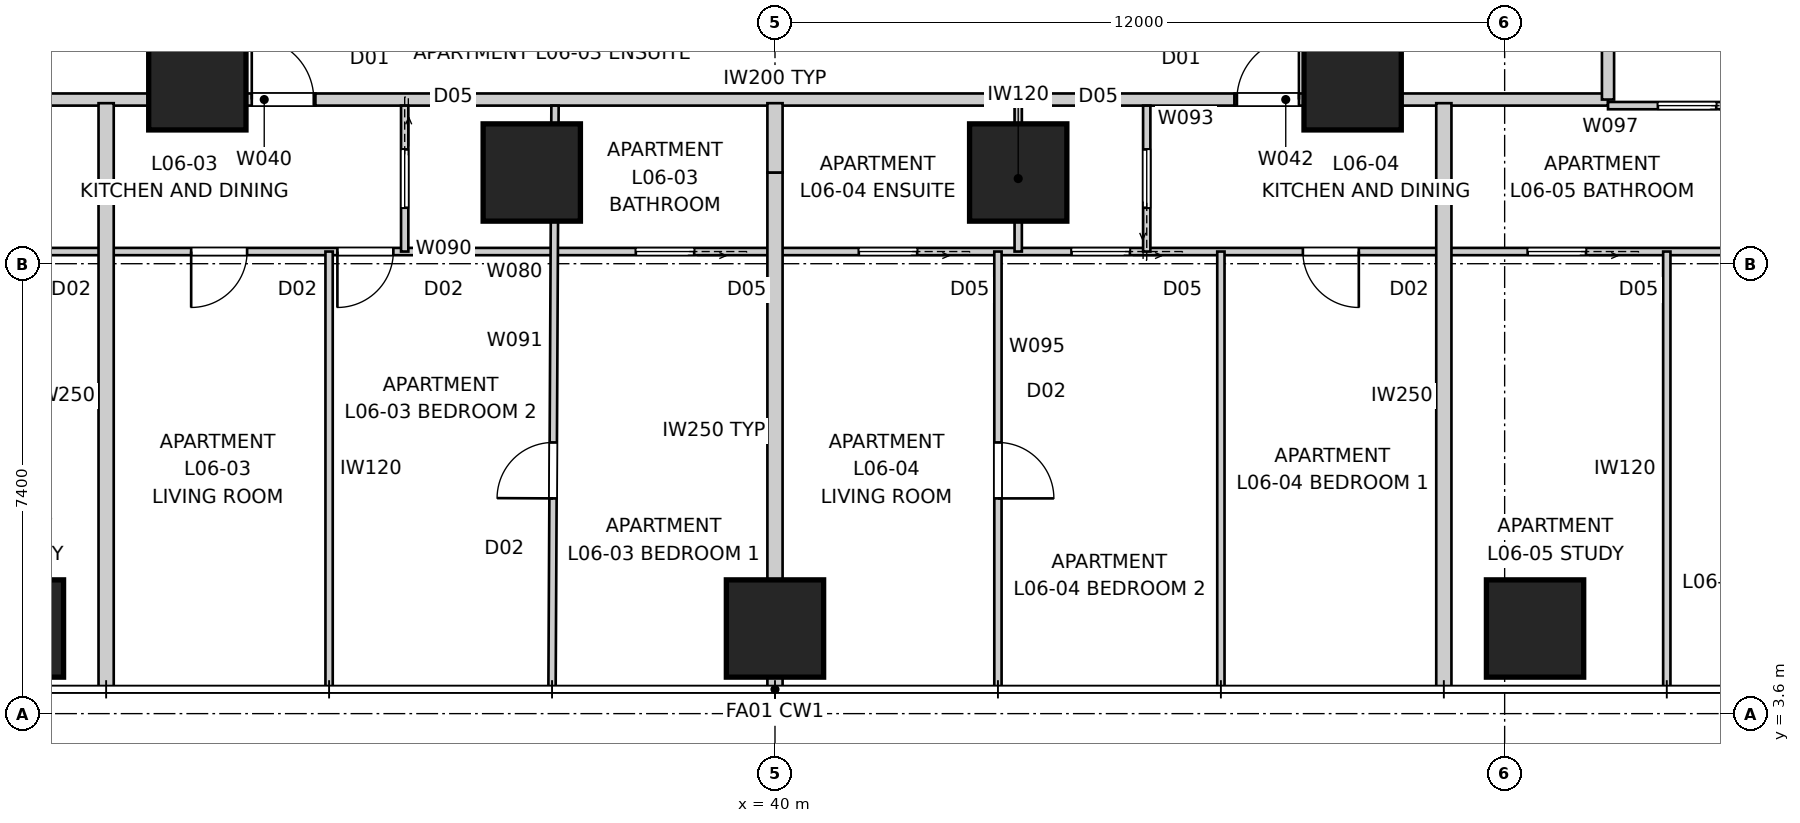
"""IFC4 building model, lengths in metres.
Left out: names, types, materials, properties, quantities, classifications, styles, units other than length and angle.
Written with IfcOpenShell. Run it as: python <this file> out.ifc"""

import sys

from ifc_helpers import new_model, si_unit, direction, frame, frame_2d, origin, origin_2d, place, context, subcontext, project, spatial, rectangle, extrude, element, fill, save


model = new_model("IFC4")
c1 = context("Model", 3, precision=1e-05, world=origin(), true_north=direction((0.0, 1.0)))
c2 = subcontext(c1, "Body", "Model", "MODEL_VIEW")
j1 = project(units=[si_unit("LENGTHUNIT", "METRE"), si_unit("PLANEANGLEUNIT", "RADIAN")], contexts=[c1])
p1 = place(None, origin())
s1 = spatial("IfcSite", under=j1, at=p1, CompositionType="ELEMENT")
p2 = place(p1, origin())
s2 = spatial("IfcBuilding", under=s1, at=p2, CompositionType="ELEMENT")
p3 = place(p2, frame((0.0, 0.0, 25.2)))
s3 = spatial("IfcBuildingStorey", under=s2, at=p3, CompositionType="ELEMENT", Elevation=25.2)
for number, where, z_axis, x_axis in (
    (1, (27.5, 5.0, 0.0), (0.0, 0.0, 1.0), (1.0, 0.0, 0.0)),
    (2, (40.0, 5.0, 0.0), (0.0, 0.0, 1.0), (1.0, 0.0, 0.0)),
    (3, (52.5, 5.0, 0.0), (0.0, 0.0, 1.0), (1.0, 0.0, 0.0)),
    (4, (30.5, 14.0, 0.0), (0.0, 0.0, 1.0), (1.0, 0.0, 0.0)),
    (5, (36.0, 12.5, 0.0), (0.0, 0.0, 1.0), (1.0, 0.0, 0.0)),
    (6, (44.0, 12.5, 0.0), (0.0, 0.0, 1.0), (1.0, 0.0, 0.0)),
    (7, (49.5, 14.0, 0.0), (0.0, 0.0, 1.0), (1.0, 0.0, 0.0)),
):
    element("IfcColumn", number, at=place(p3, frame(where, z_axis=z_axis, x_axis=x_axis)), inside=s3, PredefinedType="COLUMN", context=c2, shape_type="SweptSolid", body=[
        extrude(rectangle(XDim=1.6, YDim=1.6, at=origin_2d()), origin(), (0.0, 0.0, 1.0), 3.4),
    ])
p4 = place(p3, frame((26.3, 13.7, 0.0), z_axis=(0.0, 0.0, 1.0), x_axis=(1.0, 0.0, 0.0)))
e8 = element("IfcWall", 8, at=p4, inside=s3, PredefinedType="PARTITIONING", context=c2, shape_type="SweptSolid", body=[
    extrude(rectangle(XDim=4.458, YDim=0.2, at=frame_2d((2.229, 0.0))), origin(), (0.0, 0.0, 1.0), 3.25),
])
p5 = place(p3, frame((30.758, 13.7, 0.0), z_axis=(0.0, 0.0, 1.0), x_axis=(1.0, 0.0, 0.0)))
e9 = element("IfcWall", 9, at=p5, inside=s3, PredefinedType="PARTITIONING", context=c2, shape_type="SweptSolid", body=[
    extrude(rectangle(XDim=1.683, YDim=0.2, at=frame_2d((0.842, 0.0))), origin(), (0.0, 0.0, 1.0), 2.55),
])
p6 = place(p5, frame((0.637, 0.0, 0.0)))
e10 = element("IfcOpeningElement", 10, at=p6, cuts=e9, PredefinedType="OPENING", context=c2, shape_type="SweptSolid", body=[
    extrude(rectangle(XDim=1.02, YDim=2.34, at=frame_2d((0.51, 1.17))), frame((0.0, 0.11, 0.0), z_axis=(0.0, -1.0, 0.0), x_axis=(1.0, 0.0, 0.0)), (0.0, 0.0, 1.0), 0.22),
])
p7 = place(p3, frame((32.442, 13.7, 0.0), z_axis=(0.0, 0.0, 1.0), x_axis=(1.0, 0.0, 0.0)))
e11 = element("IfcWall", 11, at=p7, inside=s3, PredefinedType="PARTITIONING", context=c2, shape_type="SweptSolid", body=[
    extrude(rectangle(XDim=15.117, YDim=0.2, at=frame_2d((7.558, 0.0))), origin(), (0.0, 0.0, 1.0), 3.25),
])
p8 = place(p3, frame((47.558, 13.7, 0.0), z_axis=(0.0, 0.0, 1.0), x_axis=(1.0, 0.0, 0.0)))
e12 = element("IfcWall", 12, at=p8, inside=s3, PredefinedType="PARTITIONING", context=c2, shape_type="SweptSolid", body=[
    extrude(rectangle(XDim=1.683, YDim=0.2, at=frame_2d((0.842, 0.0))), origin(), (0.0, 0.0, 1.0), 2.55),
])
p9 = place(p8, frame((0.039, 0.0, 0.0)))
e13 = element("IfcOpeningElement", 13, at=p9, cuts=e12, PredefinedType="OPENING", context=c2, shape_type="SweptSolid", body=[
    extrude(rectangle(XDim=1.02, YDim=2.34, at=frame_2d((0.51, 1.17))), frame((0.0, 0.11, 0.0), z_axis=(0.0, -1.0, 0.0), x_axis=(1.0, 0.0, 0.0)), (0.0, 0.0, 1.0), 0.22),
])
p10 = place(p3, frame((49.242, 13.7, 0.0), z_axis=(0.0, 0.0, 1.0), x_axis=(1.0, 0.0, 0.0)))
e14 = element("IfcWall", 14, at=p10, inside=s3, PredefinedType="PARTITIONING", context=c2, shape_type="SweptSolid", body=[
    extrude(rectangle(XDim=4.458, YDim=0.2, at=frame_2d((2.229, 0.0))), origin(), (0.0, 0.0, 1.0), 3.25),
])
p11 = place(p3, frame((53.7, 13.7, 0.0), z_axis=(0.0, 0.0, 1.0), x_axis=(0.0, 1.0, 0.0)))
e15 = element("IfcWall", 15, at=p11, inside=s3, PredefinedType="PARTITIONING", context=c2, shape_type="SweptSolid", body=[
    extrude(rectangle(XDim=32.6, YDim=0.2, at=frame_2d((16.3, 0.0))), origin(), (0.0, 0.0, 1.0), 3.25),
])
p12 = place(p11, frame((2.315, 0.0, 0.0)))
e16 = element("IfcOpeningElement", 16, at=p12, cuts=e15, PredefinedType="OPENING", context=c2, shape_type="SweptSolid", body=[
    extrude(rectangle(XDim=1.02, YDim=2.34, at=frame_2d((0.51, 1.17))), frame((0.0, 0.11, 0.0), z_axis=(0.0, -1.0, 0.0), x_axis=(1.0, 0.0, 0.0)), (0.0, 0.0, 1.0), 0.22),
])
p13 = place(p11, frame((29.265, 0.0, 0.0)))
e17 = element("IfcOpeningElement", 17, at=p13, cuts=e15, PredefinedType="OPENING", context=c2, shape_type="SweptSolid", body=[
    extrude(rectangle(XDim=1.02, YDim=2.34, at=frame_2d((0.51, 1.17))), frame((0.0, 0.11, 0.0), z_axis=(0.0, -1.0, 0.0), x_axis=(1.0, 0.0, 0.0)), (0.0, 0.0, 1.0), 0.22),
])
p14 = place(p11, frame((20.646, 0.0, 0.0)))
e18 = element("IfcOpeningElement", 18, at=p14, cuts=e15, PredefinedType="OPENING", context=c2, shape_type="SweptSolid", body=[
    extrude(rectangle(XDim=1.02, YDim=2.34, at=frame_2d((0.51, 1.17))), frame((0.0, 0.11, 0.0), z_axis=(0.0, -1.0, 0.0), x_axis=(1.0, 0.0, 0.0)), (0.0, 0.0, 1.0), 0.22),
])
p15 = place(p11, frame((13.626, 0.0, 0.0)))
e19 = element("IfcOpeningElement", 19, at=p15, cuts=e15, PredefinedType="OPENING", context=c2, shape_type="SweptSolid", body=[
    extrude(rectangle(XDim=1.02, YDim=2.34, at=frame_2d((0.51, 1.17))), frame((0.0, 0.11, 0.0), z_axis=(0.0, -1.0, 0.0), x_axis=(1.0, 0.0, 0.0)), (0.0, 0.0, 1.0), 0.22),
])
p16 = place(p3, frame((29.0, 4.0, 0.0), z_axis=(0.0, 0.0, 1.0), x_axis=(0.0, 1.0, 0.0)))
e20 = element("IfcWall", 20, at=p16, inside=s3, PredefinedType="PARTITIONING", context=c2, shape_type="SweptSolid", body=[
    extrude(rectangle(XDim=9.64, YDim=0.25, at=frame_2d((4.82, 0.0))), origin(), (0.0, 0.0, 1.0), 3.25),
])
p17 = place(p3, frame((40.0, 4.0, 0.0), z_axis=(0.0, 0.0, 1.0), x_axis=(0.0, 1.0, 0.0)))
e21 = element("IfcWall", 21, at=p17, inside=s3, PredefinedType="PARTITIONING", context=c2, shape_type="SweptSolid", body=[
    extrude(rectangle(XDim=8.5, YDim=0.25, at=frame_2d((4.25, 0.0))), origin(), (0.0, 0.0, 1.0), 3.25),
])
p18 = place(p3, frame((40.0, 12.5, 0.0), z_axis=(0.0, 0.0, 1.0), x_axis=(0.0, 1.0, 0.0)))
e22 = element("IfcWall", 22, at=p18, inside=s3, PredefinedType="PARTITIONING", context=c2, shape_type="SweptSolid", body=[
    extrude(rectangle(XDim=1.14, YDim=0.25, at=frame_2d((0.57, 0.0))), origin(), (0.0, 0.0, 1.0), 2.796),
])
p19 = place(p3, frame((51.0, 4.0, 0.0), z_axis=(0.0, 0.0, 1.0), x_axis=(0.0, 1.0, 0.0)))
e23 = element("IfcWall", 23, at=p19, inside=s3, PredefinedType="PARTITIONING", context=c2, shape_type="SweptSolid", body=[
    extrude(rectangle(XDim=9.64, YDim=0.25, at=frame_2d((4.82, 0.0))), origin(), (0.0, 0.0, 1.0), 3.25),
])
p20 = place(p3, frame((56.2, 11.2, 0.0), z_axis=(0.0, 0.0, 1.0), x_axis=(-1.0, 0.0, 0.0)))
e24 = element("IfcWall", 24, at=p20, inside=s3, PredefinedType="PARTITIONING", context=c2, shape_type="SweptSolid", body=[
    extrude(rectangle(XDim=32.4, YDim=0.12, at=frame_2d((16.2, 0.0))), origin(), (0.0, 0.0, 1.0), 3.25),
])
p21 = place(p20, frame((24.882, 0.0, 0.0)))
e25 = element("IfcOpeningElement", 25, at=p21, cuts=e24, PredefinedType="OPENING", context=c2, shape_type="SweptSolid", body=[
    extrude(rectangle(XDim=0.92, YDim=2.34, at=frame_2d((0.46, 1.17))), frame((0.0, 0.07, 0.0), z_axis=(0.0, -1.0, 0.0), x_axis=(1.0, 0.0, 0.0)), (0.0, 0.0, 1.0), 0.14),
])
p22 = place(p20, frame((22.477, 0.0, 0.0)))
e26 = element("IfcOpeningElement", 26, at=p22, cuts=e24, PredefinedType="OPENING", context=c2, shape_type="SweptSolid", body=[
    extrude(rectangle(XDim=0.92, YDim=2.34, at=frame_2d((0.46, 1.17))), frame((0.0, 0.07, 0.0), z_axis=(0.0, -1.0, 0.0), x_axis=(1.0, 0.0, 0.0)), (0.0, 0.0, 1.0), 0.14),
])
p23 = place(p20, frame((6.598, 0.0, 0.0)))
e27 = element("IfcOpeningElement", 27, at=p23, cuts=e24, PredefinedType="OPENING", context=c2, shape_type="SweptSolid", body=[
    extrude(rectangle(XDim=0.92, YDim=2.34, at=frame_2d((0.46, 1.17))), frame((0.0, 0.07, 0.0), z_axis=(0.0, -1.0, 0.0), x_axis=(1.0, 0.0, 0.0)), (0.0, 0.0, 1.0), 0.14),
])
p24 = place(p20, frame((28.598, 0.0, 0.0)))
e28 = element("IfcOpeningElement", 28, at=p24, cuts=e24, PredefinedType="OPENING", context=c2, shape_type="SweptSolid", body=[
    extrude(rectangle(XDim=0.92, YDim=2.34, at=frame_2d((0.46, 1.17))), frame((0.0, 0.07, 0.0), z_axis=(0.0, -1.0, 0.0), x_axis=(1.0, 0.0, 0.0)), (0.0, 0.0, 1.0), 0.14),
])
p25 = place(p20, frame((2.862, 0.0, 0.0)))
e29 = element("IfcOpeningElement", 29, at=p25, cuts=e24, PredefinedType="OPENING", context=c2, shape_type="SweptSolid", body=[
    extrude(rectangle(XDim=0.96, YDim=2.1, at=frame_2d((0.48, 1.05))), frame((0.0, 0.07, 0.0), z_axis=(0.0, -1.0, 0.0), x_axis=(1.0, 0.0, 0.0)), (0.0, 0.0, 1.0), 0.14),
])
p26 = place(p20, frame((10.363, 0.0, 0.0)))
e30 = element("IfcOpeningElement", 30, at=p26, cuts=e24, PredefinedType="OPENING", context=c2, shape_type="SweptSolid", body=[
    extrude(rectangle(XDim=0.96, YDim=2.1, at=frame_2d((0.48, 1.05))), frame((0.0, 0.07, 0.0), z_axis=(0.0, -1.0, 0.0), x_axis=(1.0, 0.0, 0.0)), (0.0, 0.0, 1.0), 0.14),
])
p27 = place(p20, frame((13.862, 0.0, 0.0)))
e31 = element("IfcOpeningElement", 31, at=p27, cuts=e24, PredefinedType="OPENING", context=c2, shape_type="SweptSolid", body=[
    extrude(rectangle(XDim=0.96, YDim=2.1, at=frame_2d((0.48, 1.05))), frame((0.0, 0.07, 0.0), z_axis=(0.0, -1.0, 0.0), x_axis=(1.0, 0.0, 0.0)), (0.0, 0.0, 1.0), 0.14),
])
p28 = place(p20, frame((17.529, 0.0, 0.0)))
e32 = element("IfcOpeningElement", 32, at=p28, cuts=e24, PredefinedType="OPENING", context=c2, shape_type="SweptSolid", body=[
    extrude(rectangle(XDim=0.96, YDim=2.1, at=frame_2d((0.48, 1.05))), frame((0.0, 0.07, 0.0), z_axis=(0.0, -1.0, 0.0), x_axis=(1.0, 0.0, 0.0)), (0.0, 0.0, 1.0), 0.14),
])
p29 = place(p3, frame((33.91, 13.6, 0.0), z_axis=(0.0, 0.0, 1.0), x_axis=(0.0, -1.0, 0.0)))
e33 = element("IfcWall", 33, at=p29, inside=s3, PredefinedType="PARTITIONING", context=c2, shape_type="SweptSolid", body=[
    extrude(rectangle(XDim=2.4, YDim=0.12, at=frame_2d((1.2, 0.0))), origin(), (0.0, 0.0, 1.0), 3.25),
])
p30 = place(p29, frame((0.72, 0.0, 0.0)))
e34 = element("IfcOpeningElement", 34, at=p30, cuts=e33, PredefinedType="OPENING", context=c2, shape_type="SweptSolid", body=[
    extrude(rectangle(XDim=0.96, YDim=2.1, at=frame_2d((0.48, 1.05))), frame((0.0, 0.07, 0.0), z_axis=(0.0, -1.0, 0.0), x_axis=(1.0, 0.0, 0.0)), (0.0, 0.0, 1.0), 0.14),
])
p31 = place(p3, frame((36.333, 4.04, 0.0), z_axis=(0.0, 0.0, 1.0), x_axis=(0.005107446534, 0.99998695691, 0.0)))
e35 = element("IfcWall", 35, at=p31, inside=s3, PredefinedType="PARTITIONING", context=c2, shape_type="SweptSolid", body=[
    extrude(rectangle(XDim=9.56, YDim=0.12, at=frame_2d((4.78, 0.0))), origin(), (0.0, 0.0, 1.0), 3.25),
])
p32 = place(p31, frame((3.1, 0.0, 0.0)))
e36 = element("IfcOpeningElement", 36, at=p32, cuts=e35, PredefinedType="OPENING", context=c2, shape_type="SweptSolid", body=[
    extrude(rectangle(XDim=0.92, YDim=2.34, at=frame_2d((0.46, 1.17))), frame((0.0, 0.07, 0.0), z_axis=(0.0, -1.0, 0.0), x_axis=(1.0, 0.0, 0.0)), (0.0, 0.0, 1.0), 0.14),
])
p33 = place(p3, frame((32.667, 11.2, 0.0), z_axis=(0.0, 0.0, 1.0), x_axis=(0.0, -1.0, 0.0)))
e37 = element("IfcWall", 37, at=p33, inside=s3, PredefinedType="PARTITIONING", context=c2, shape_type="SweptSolid", body=[
    extrude(rectangle(XDim=7.16, YDim=0.12, at=frame_2d((3.58, 0.0))), origin(), (0.0, 0.0, 1.0), 3.25),
])
p34 = place(p3, frame((46.114, 11.2, 0.0), z_axis=(0.0, 0.0, 1.0), x_axis=(0.0, 1.0, 0.0)))
e38 = element("IfcWall", 38, at=p34, inside=s3, PredefinedType="PARTITIONING", context=c2, shape_type="SweptSolid", body=[
    extrude(rectangle(XDim=2.4, YDim=0.12, at=frame_2d((1.2, 0.0))), origin(), (0.0, 0.0, 1.0), 3.25),
])
p35 = place(p34, frame((0.72, 0.0, 0.0)))
e39 = element("IfcOpeningElement", 39, at=p35, cuts=e38, PredefinedType="OPENING", context=c2, shape_type="SweptSolid", body=[
    extrude(rectangle(XDim=0.96, YDim=2.1, at=frame_2d((0.48, 1.05))), frame((0.0, 0.07, 0.0), z_axis=(0.0, -1.0, 0.0), x_axis=(1.0, 0.0, 0.0)), (0.0, 0.0, 1.0), 0.14),
])
p36 = place(p3, frame((44.0, 11.2, 0.0), z_axis=(0.0, 0.0, 1.0), x_axis=(0.0, 1.0, 0.0)))
e40 = element("IfcWall", 40, at=p36, inside=s3, PredefinedType="PARTITIONING", context=c2, shape_type="SweptSolid", body=[
    extrude(rectangle(XDim=2.4, YDim=0.12, at=frame_2d((1.2, 0.0))), origin(), (0.0, 0.0, 1.0), 3.25),
])
p37 = place(p3, frame((43.667, 11.2, 0.0), z_axis=(0.0, 0.0, 1.0), x_axis=(0.0, -1.0, 0.0)))
e41 = element("IfcWall", 41, at=p37, inside=s3, PredefinedType="PARTITIONING", context=c2, shape_type="SweptSolid", body=[
    extrude(rectangle(XDim=7.16, YDim=0.12, at=frame_2d((3.58, 0.0))), origin(), (0.0, 0.0, 1.0), 3.25),
])
p38 = place(p37, frame((3.14, 0.0, 0.0)))
e42 = element("IfcOpeningElement", 42, at=p38, cuts=e41, PredefinedType="OPENING", context=c2, shape_type="SweptSolid", body=[
    extrude(rectangle(XDim=0.92, YDim=2.34, at=frame_2d((0.46, 1.17))), frame((0.0, 0.07, 0.0), z_axis=(0.0, -1.0, 0.0), x_axis=(1.0, 0.0, 0.0)), (0.0, 0.0, 1.0), 0.14),
])
p39 = place(p3, frame((47.333, 4.04, 0.0), z_axis=(0.0, 0.0, 1.0), x_axis=(0.0, 1.0, 0.0)))
e43 = element("IfcWall", 43, at=p39, inside=s3, PredefinedType="PARTITIONING", context=c2, shape_type="SweptSolid", body=[
    extrude(rectangle(XDim=7.16, YDim=0.12, at=frame_2d((3.58, 0.0))), origin(), (0.0, 0.0, 1.0), 3.25),
])
p40 = place(p3, frame((56.2, 13.6, 0.0), z_axis=(0.0, 0.0, 1.0), x_axis=(-1.0, 0.0, 0.0)))
e44 = element("IfcWall", 44, at=p40, inside=s3, PredefinedType="PARTITIONING", context=c2, shape_type="SweptSolid", body=[
    extrude(rectangle(XDim=2.5, YDim=0.12, at=frame_2d((1.25, 0.0))), origin(), (0.0, 0.0, 1.0), 3.25),
])
p41 = place(p40, frame((0.72, 0.0, 0.0)))
e45 = element("IfcOpeningElement", 45, at=p41, cuts=e44, PredefinedType="OPENING", context=c2, shape_type="SweptSolid", body=[
    extrude(rectangle(XDim=0.96, YDim=2.1, at=frame_2d((0.48, 1.05))), frame((0.0, 0.07, 0.0), z_axis=(0.0, -1.0, 0.0), x_axis=(1.0, 0.0, 0.0)), (0.0, 0.0, 1.0), 0.14),
])
p42 = place(p3, frame((54.667, 4.04, 0.0), z_axis=(0.0, 0.0, 1.0), x_axis=(0.0, 1.0, 0.0)))
e46 = element("IfcWall", 46, at=p42, inside=s3, PredefinedType="PARTITIONING", context=c2, shape_type="SweptSolid", body=[
    extrude(rectangle(XDim=7.16, YDim=0.12, at=frame_2d((3.58, 0.0))), origin(), (0.0, 0.0, 1.0), 2.637),
])
p43 = place(p6, origin())
e47 = element("IfcDoor", 47, at=p43, inside=s3, OperationType="SINGLE_SWING_LEFT", PredefinedType="DOOR", context=c2, shape_type="SweptSolid", body=[
    extrude(rectangle(XDim=1.02, YDim=2.34, at=frame_2d((0.51, 1.17))), frame((0.0, 0.025, 0.0), z_axis=(0.0, -1.0, 0.0), x_axis=(1.0, 0.0, 0.0)), (0.0, 0.0, 1.0), 0.05),
])
fill(e10, e47)
p44 = place(p9, origin())
e48 = element("IfcDoor", 48, at=p44, inside=s3, OperationType="SINGLE_SWING_RIGHT", PredefinedType="DOOR", context=c2, shape_type="SweptSolid", body=[
    extrude(rectangle(XDim=1.02, YDim=2.34, at=frame_2d((0.51, 1.17))), frame((0.0, 0.025, 0.0), z_axis=(0.0, -1.0, 0.0), x_axis=(1.0, 0.0, 0.0)), (0.0, 0.0, 1.0), 0.05),
])
fill(e13, e48)
p45 = place(p41, origin())
e49 = element("IfcDoor", 49, at=p45, inside=s3, OperationType="SLIDING_TO_LEFT", PredefinedType="DOOR", context=c2, shape_type="SweptSolid", body=[
    extrude(rectangle(XDim=0.96, YDim=2.1, at=frame_2d((0.48, 1.05))), frame((0.0, 0.025, 0.0), z_axis=(0.0, -1.0, 0.0), x_axis=(1.0, 0.0, 0.0)), (0.0, 0.0, 1.0), 0.05),
])
fill(e45, e49)
p46 = place(p21, origin())
e50 = element("IfcDoor", 50, at=p46, inside=s3, OperationType="SINGLE_SWING_RIGHT", PredefinedType="DOOR", context=c2, shape_type="SweptSolid", body=[
    extrude(rectangle(XDim=0.92, YDim=2.34, at=frame_2d((0.46, 1.17))), frame((0.0, 0.025, 0.0), z_axis=(0.0, -1.0, 0.0), x_axis=(1.0, 0.0, 0.0)), (0.0, 0.0, 1.0), 0.05),
])
fill(e25, e50)
p47 = place(p30, origin())
e51 = element("IfcDoor", 51, at=p47, inside=s3, OperationType="SLIDING_TO_LEFT", PredefinedType="DOOR", context=c2, shape_type="SweptSolid", body=[
    extrude(rectangle(XDim=0.96, YDim=2.1, at=frame_2d((0.48, 1.05))), frame((0.0, 0.025, 0.0), z_axis=(0.0, -1.0, 0.0), x_axis=(1.0, 0.0, 0.0)), (0.0, 0.0, 1.0), 0.05),
])
fill(e34, e51)
p48 = place(p22, origin())
e52 = element("IfcDoor", 52, at=p48, inside=s3, OperationType="SINGLE_SWING_RIGHT", PredefinedType="DOOR", context=c2, shape_type="SweptSolid", body=[
    extrude(rectangle(XDim=0.92, YDim=2.34, at=frame_2d((0.46, 1.17))), frame((0.0, 0.025, 0.0), z_axis=(0.0, -1.0, 0.0), x_axis=(1.0, 0.0, 0.0)), (0.0, 0.0, 1.0), 0.05),
])
fill(e26, e52)
p49 = place(p23, origin())
e53 = element("IfcDoor", 53, at=p49, inside=s3, OperationType="SINGLE_SWING_LEFT", PredefinedType="DOOR", context=c2, shape_type="SweptSolid", body=[
    extrude(rectangle(XDim=0.92, YDim=2.34, at=frame_2d((0.46, 1.17))), frame((0.0, 0.025, 0.0), z_axis=(0.0, -1.0, 0.0), x_axis=(1.0, 0.0, 0.0)), (0.0, 0.0, 1.0), 0.05),
])
fill(e27, e53)
p50 = place(p35, origin())
e54 = element("IfcDoor", 54, at=p50, inside=s3, OperationType="SLIDING_TO_LEFT", PredefinedType="DOOR", context=c2, shape_type="SweptSolid", body=[
    extrude(rectangle(XDim=0.96, YDim=2.1, at=frame_2d((0.48, 1.05))), frame((0.0, 0.025, 0.0), z_axis=(0.0, -1.0, 0.0), x_axis=(1.0, 0.0, 0.0)), (0.0, 0.0, 1.0), 0.05),
])
fill(e39, e54)
p51 = place(p25, origin())
e55 = element("IfcDoor", 55, at=p51, inside=s3, OperationType="SLIDING_TO_LEFT", PredefinedType="DOOR", context=c2, shape_type="SweptSolid", body=[
    extrude(rectangle(XDim=0.96, YDim=2.1, at=frame_2d((0.48, 1.05))), frame((0.0, 0.025, 0.0), z_axis=(0.0, -1.0, 0.0), x_axis=(1.0, 0.0, 0.0)), (0.0, 0.0, 1.0), 0.05),
])
fill(e29, e55)
p52 = place(p26, origin())
e56 = element("IfcDoor", 56, at=p52, inside=s3, OperationType="SLIDING_TO_LEFT", PredefinedType="DOOR", context=c2, shape_type="SweptSolid", body=[
    extrude(rectangle(XDim=0.96, YDim=2.1, at=frame_2d((0.48, 1.05))), frame((0.0, 0.025, 0.0), z_axis=(0.0, -1.0, 0.0), x_axis=(1.0, 0.0, 0.0)), (0.0, 0.0, 1.0), 0.05),
])
fill(e30, e56)
p53 = place(p32, origin())
e57 = element("IfcDoor", 57, at=p53, inside=s3, OperationType="SINGLE_SWING_LEFT", PredefinedType="DOOR", context=c2, shape_type="SweptSolid", body=[
    extrude(rectangle(XDim=0.92, YDim=2.34, at=frame_2d((0.46, 1.17))), frame((0.0, 0.025, 0.0), z_axis=(0.0, -1.0, 0.0), x_axis=(1.0, 0.0, 0.0)), (0.0, 0.0, 1.0), 0.05),
])
fill(e36, e57)
p54 = place(p38, origin())
e58 = element("IfcDoor", 58, at=p54, inside=s3, OperationType="SINGLE_SWING_RIGHT", PredefinedType="DOOR", context=c2, shape_type="SweptSolid", body=[
    extrude(rectangle(XDim=0.92, YDim=2.34, at=frame_2d((0.46, 1.17))), frame((0.0, 0.025, 0.0), z_axis=(0.0, -1.0, 0.0), x_axis=(1.0, 0.0, 0.0)), (0.0, 0.0, 1.0), 0.05),
])
fill(e42, e58)
p55 = place(p27, origin())
e59 = element("IfcDoor", 59, at=p55, inside=s3, OperationType="SLIDING_TO_LEFT", PredefinedType="DOOR", context=c2, shape_type="SweptSolid", body=[
    extrude(rectangle(XDim=0.96, YDim=2.1, at=frame_2d((0.48, 1.05))), frame((0.0, 0.025, 0.0), z_axis=(0.0, -1.0, 0.0), x_axis=(1.0, 0.0, 0.0)), (0.0, 0.0, 1.0), 0.05),
])
fill(e31, e59)
p56 = place(p28, origin())
e60 = element("IfcDoor", 60, at=p56, inside=s3, OperationType="SLIDING_TO_LEFT", PredefinedType="DOOR", context=c2, shape_type="SweptSolid", body=[
    extrude(rectangle(XDim=0.96, YDim=2.1, at=frame_2d((0.48, 1.05))), frame((0.0, 0.025, 0.0), z_axis=(0.0, -1.0, 0.0), x_axis=(1.0, 0.0, 0.0)), (0.0, 0.0, 1.0), 0.05),
])
fill(e32, e60)
save(model, sys.argv[1])
